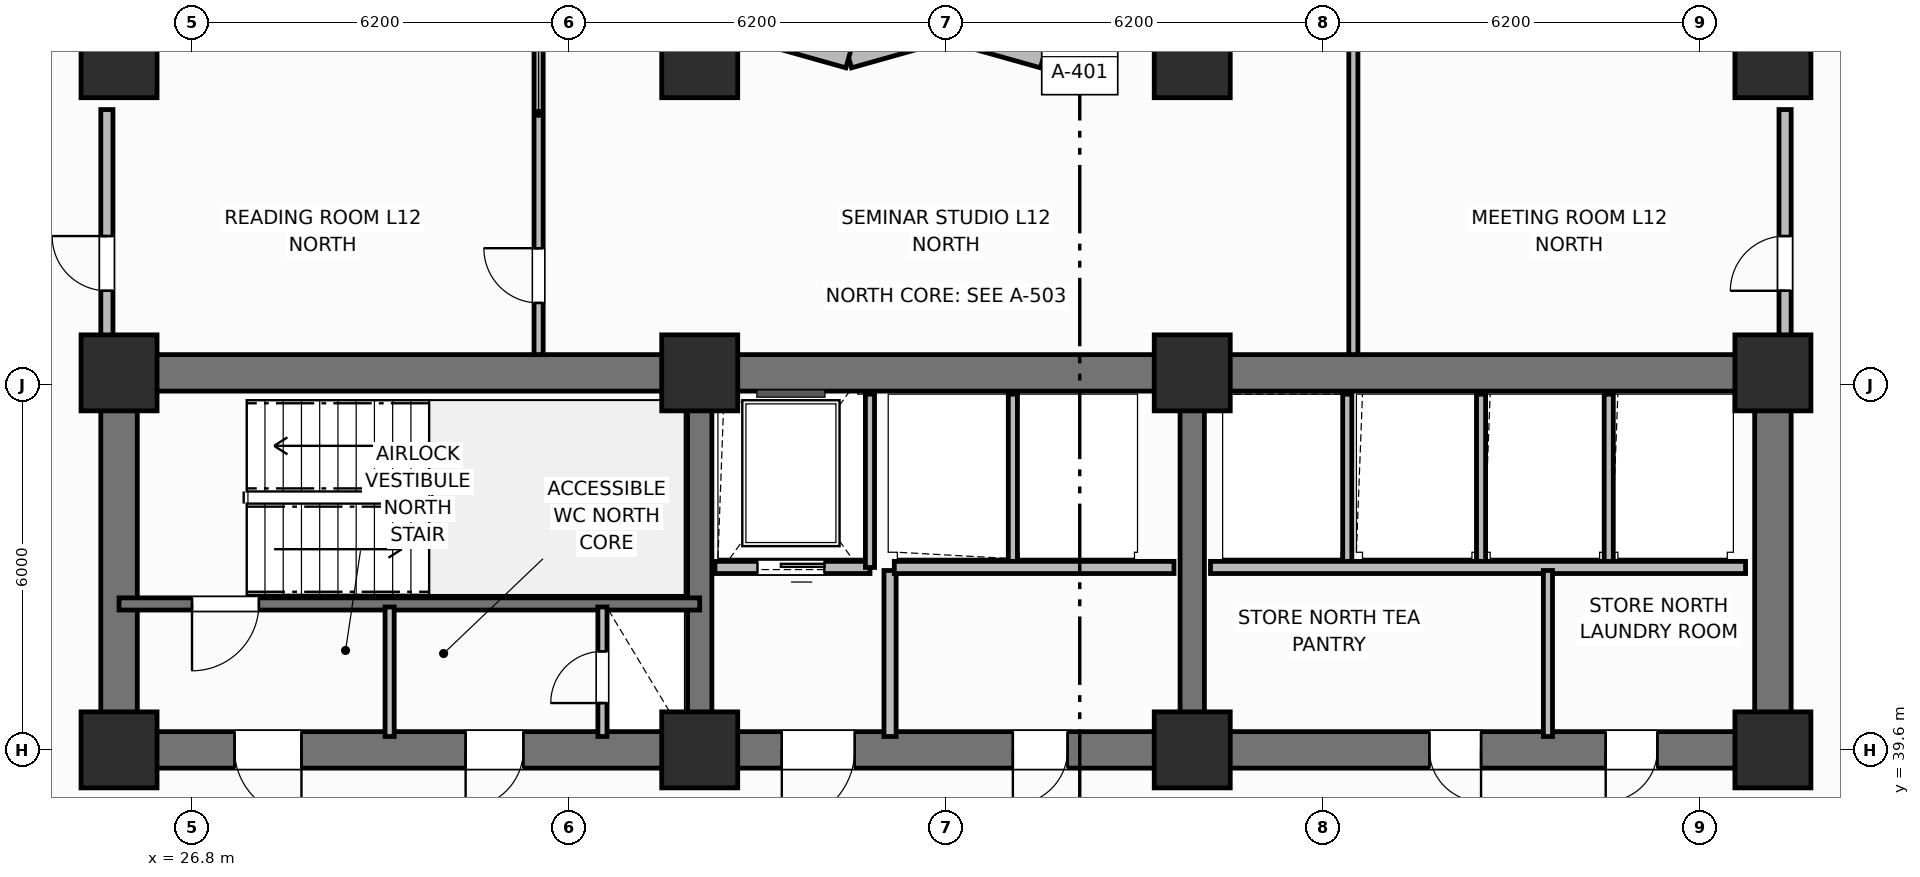
"""IFC4 building model, lengths in metres.
Left out: names, types, materials, properties, quantities, classifications, styles, units other than length and angle.
Written with IfcOpenShell. Run it as: python <this file> out.ifc"""

import sys

from ifc_helpers import new_model, si_unit, direction, frame, frame_2d, origin, origin_2d, place, context, subcontext, project, spatial, rectangle, extrude, element, fill, save


model = new_model("IFC4")
c1 = context("Model", 3, precision=1e-05, world=origin(), true_north=direction((0.0, 1.0)))
c2 = subcontext(c1, "Body", "Model", "MODEL_VIEW")
j1 = project(units=[si_unit("LENGTHUNIT", "METRE"), si_unit("PLANEANGLEUNIT", "RADIAN")], contexts=[c1])
p1 = place(None, origin())
s1 = spatial("IfcSite", under=j1, at=p1, CompositionType="ELEMENT")
p2 = place(p1, origin())
s2 = spatial("IfcBuilding", under=s1, at=p2, CompositionType="ELEMENT")
p3 = place(p2, frame((0.0, 0.0, 51.0)))
s3 = spatial("IfcBuildingStorey", under=s2, at=p3, CompositionType="ELEMENT", Elevation=51.0)
p4 = place(p3, frame((25.6, 45.8, 0.0), z_axis=(0.0, 0.0, 1.0), x_axis=(1.0, 0.0, 0.0)))
e1 = element("IfcWall", 1, at=p4, inside=s3, PredefinedType="SHEAR", context=c2, shape_type="SweptSolid", body=[
    extrude(rectangle(XDim=27.2, YDim=0.6, at=frame_2d((13.6, 0.0))), origin(), (0.0, 0.0, 1.0), 3.7),
])
for number, where, z_axis, x_axis in (
    (2, (25.6, 39.9, 0.0), (0.0, 0.0, 1.0), (0.0, 1.0, 0.0)),
    (3, (52.8, 39.9, 0.0), (0.0, 0.0, 1.0), (0.0, 1.0, 0.0)),
):
    element("IfcWall", number, at=place(p3, frame(where, z_axis=z_axis, x_axis=x_axis)), inside=s3, PredefinedType="SHEAR", context=c2, shape_type="SweptSolid", body=[
        extrude(rectangle(XDim=5.6, YDim=0.6, at=frame_2d((2.8, 0.0))), origin(), (0.0, 0.0, 1.0), 3.7),
    ])
p5 = place(p3, frame((52.8, 39.6, 0.0), z_axis=(0.0, 0.0, 1.0), x_axis=(-1.0, 0.0, 0.0)))
e4 = element("IfcWall", 4, at=p5, inside=s3, PredefinedType="SHEAR", context=c2, shape_type="SweptSolid", body=[
    extrude(rectangle(XDim=27.2, YDim=0.6, at=frame_2d((13.6, 0.0))), origin(), (0.0, 0.0, 1.0), 3.7),
])
p6 = place(p5, frame((24.2, 0.0, 0.0)))
e5 = element("IfcOpeningElement", 5, at=p6, cuts=e4, PredefinedType="OPENING", context=c2, shape_type="SweptSolid", body=[
    extrude(rectangle(XDim=1.1, YDim=2.15, at=frame_2d((0.55, 1.075))), frame((0.0, 0.31, 0.0), z_axis=(0.0, -1.0, 0.0), x_axis=(1.0, 0.0, 0.0)), (0.0, 0.0, 1.0), 0.62),
])
p7 = place(p5, frame((20.55, 0.0, 0.0)))
e6 = element("IfcOpeningElement", 6, at=p7, cuts=e4, PredefinedType="OPENING", context=c2, shape_type="SweptSolid", body=[
    extrude(rectangle(XDim=0.95, YDim=2.1, at=frame_2d((0.475, 1.05))), frame((0.0, 0.31, 0.0), z_axis=(0.0, -1.0, 0.0), x_axis=(1.0, 0.0, 0.0)), (0.0, 0.0, 1.0), 0.62),
])
p8 = place(p5, frame((15.1, 0.0, 0.0)))
e7 = element("IfcOpeningElement", 7, at=p8, cuts=e4, PredefinedType="OPENING", context=c2, shape_type="SweptSolid", body=[
    extrude(rectangle(XDim=1.2, YDim=2.15, at=frame_2d((0.6, 1.075))), frame((0.0, 0.31, 0.0), z_axis=(0.0, -1.0, 0.0), x_axis=(1.0, 0.0, 0.0)), (0.0, 0.0, 1.0), 0.62),
])
p9 = place(p5, frame((11.6, 0.0, 0.0)))
e8 = element("IfcOpeningElement", 8, at=p9, cuts=e4, PredefinedType="OPENING", context=c2, shape_type="SweptSolid", body=[
    extrude(rectangle(XDim=0.9, YDim=2.1, at=frame_2d((0.45, 1.05))), frame((0.0, 0.31, 0.0), z_axis=(0.0, -1.0, 0.0), x_axis=(1.0, 0.0, 0.0)), (0.0, 0.0, 1.0), 0.62),
])
p10 = place(p5, frame((4.8, 0.0, 0.0)))
e9 = element("IfcOpeningElement", 9, at=p10, cuts=e4, PredefinedType="OPENING", context=c2, shape_type="SweptSolid", body=[
    extrude(rectangle(XDim=0.85, YDim=2.1, at=frame_2d((0.425, 1.05))), frame((0.0, 0.31, 0.0), z_axis=(0.0, -1.0, 0.0), x_axis=(1.0, 0.0, 0.0)), (0.0, 0.0, 1.0), 0.62),
])
p11 = place(p5, frame((1.9, 0.0, 0.0)))
e10 = element("IfcOpeningElement", 10, at=p11, cuts=e4, PredefinedType="OPENING", context=c2, shape_type="SweptSolid", body=[
    extrude(rectangle(XDim=0.85, YDim=2.1, at=frame_2d((0.425, 1.05))), frame((0.0, 0.31, 0.0), z_axis=(0.0, -1.0, 0.0), x_axis=(1.0, 0.0, 0.0)), (0.0, 0.0, 1.0), 0.62),
])
for number, where, z_axis, x_axis in (
    (11, (35.15, 39.9, 0.0), (0.0, 0.0, 1.0), (0.0, 1.0, 0.0)),
    (12, (43.25, 39.9, 0.0), (0.0, 0.0, 1.0), (0.0, 1.0, 0.0)),
):
    element("IfcWall", number, at=place(p3, frame(where, z_axis=z_axis, x_axis=x_axis)), inside=s3, PredefinedType="SHEAR", context=c2, shape_type="SweptSolid", body=[
        extrude(rectangle(XDim=5.6, YDim=0.4, at=frame_2d((2.8, 0.0))), origin(), (0.0, 0.0, 1.0), 3.7),
    ])
for number, where, z_axis, x_axis in (
    (13, (25.6, 39.6, 0.0), (0.0, 0.0, 1.0), (1.0, 0.0, 0.0)),
    (14, (25.6, 45.8, 0.0), (0.0, 0.0, 1.0), (1.0, 0.0, 0.0)),
    (15, (35.15, 39.6, 0.0), (0.0, 0.0, 1.0), (1.0, 0.0, 0.0)),
    (16, (35.15, 45.8, 0.0), (0.0, 0.0, 1.0), (1.0, 0.0, 0.0)),
    (17, (43.25, 39.6, 0.0), (0.0, 0.0, 1.0), (1.0, 0.0, 0.0)),
    (18, (43.25, 45.8, 0.0), (0.0, 0.0, 1.0), (1.0, 0.0, 0.0)),
    (19, (52.8, 39.6, 0.0), (0.0, 0.0, 1.0), (1.0, 0.0, 0.0)),
    (20, (52.8, 45.8, 0.0), (0.0, 0.0, 1.0), (1.0, 0.0, 0.0)),
    (21, (25.6, 50.95, 0.0), (0.0, 0.0, 1.0), (1.0, 0.0, 0.0)),
    (22, (35.15, 50.95, 0.0), (0.0, 0.0, 1.0), (1.0, 0.0, 0.0)),
    (23, (43.25, 50.95, 0.0), (0.0, 0.0, 1.0), (1.0, 0.0, 0.0)),
    (24, (52.8, 50.95, 0.0), (0.0, 0.0, 1.0), (1.0, 0.0, 0.0)),
):
    element("IfcColumn", number, at=place(p3, frame(where, z_axis=z_axis, x_axis=x_axis)), inside=s3, PredefinedType="COLUMN", context=c2, shape_type="SweptSolid", body=[
        extrude(rectangle(XDim=1.25, YDim=1.25, at=origin_2d()), origin(), (0.0, 0.0, 1.0), 3.7),
    ])
p12 = place(p3, frame((42.4, 51.43, 0.0), z_axis=(0.0, 0.0, 1.0), x_axis=(-0.962652136636, -0.270741322725, 0.0)))
e25 = element("IfcWall", 25, at=p12, inside=s3, PredefinedType="SOLIDWALL", context=c2, shape_type="SweptSolid", body=[
    extrude(rectangle(XDim=1.662, YDim=0.34, at=frame_2d((0.831, 0.0))), origin(), (0.0, 0.0, 1.0), 2.7),
])
p13 = place(p3, frame((40.8, 50.98, 0.0), z_axis=(0.0, 0.0, 1.0), x_axis=(-0.962662902433, 0.270703040766, 0.0)))
e26 = element("IfcWall", 26, at=p13, inside=s3, PredefinedType="SOLIDWALL", context=c2, shape_type="SweptSolid", body=[
    extrude(rectangle(XDim=1.662, YDim=0.34, at=frame_2d((0.831, 0.0))), origin(), (0.0, 0.0, 1.0), 2.7),
])
p14 = place(p3, frame((39.2, 51.43, 0.0), z_axis=(0.0, 0.0, 1.0), x_axis=(-0.962652136636, -0.270741322725, 0.0)))
e27 = element("IfcWall", 27, at=p14, inside=s3, PredefinedType="SOLIDWALL", context=c2, shape_type="SweptSolid", body=[
    extrude(rectangle(XDim=1.662, YDim=0.34, at=frame_2d((0.831, 0.0))), origin(), (0.0, 0.0, 1.0), 2.7),
])
p15 = place(p3, frame((37.6, 50.98, 0.0), z_axis=(0.0, 0.0, 1.0), x_axis=(-0.962662902433, 0.270703040766, 0.0)))
e28 = element("IfcWall", 28, at=p15, inside=s3, PredefinedType="SOLIDWALL", context=c2, shape_type="SweptSolid", body=[
    extrude(rectangle(XDim=1.662, YDim=0.34, at=frame_2d((0.831, 0.0))), origin(), (0.0, 0.0, 1.0), 2.7),
])
p16 = place(p3, frame((35.15, 42.0, 0.0), z_axis=(0.0, 0.0, 1.0), x_axis=(-1.0, 0.0, 0.0)))
e29 = element("IfcWall", 29, at=p16, inside=s3, PredefinedType="SHEAR", context=c2, shape_type="SweptSolid", body=[
    extrude(rectangle(XDim=9.55, YDim=0.2, at=frame_2d((4.775, 0.0))), origin(), (0.0, 0.0, 1.0), 3.7),
])
p17 = place(p16, frame((7.25, 0.0, 0.0)))
e30 = element("IfcOpeningElement", 30, at=p17, cuts=e29, PredefinedType="OPENING", context=c2, shape_type="SweptSolid", body=[
    extrude(rectangle(XDim=1.1, YDim=2.15, at=frame_2d((0.55, 1.075))), frame((0.0, 0.11, 0.0), z_axis=(0.0, -1.0, 0.0), x_axis=(1.0, 0.0, 0.0)), (0.0, 0.0, 1.0), 0.22),
])
p18 = place(p3, frame((33.55, 39.82, 0.0), z_axis=(0.0, 0.0, 1.0), x_axis=(0.0, 1.0, 0.0)))
e31 = element("IfcWall", 31, at=p18, inside=s3, PredefinedType="PARTITIONING", context=c2, shape_type="SweptSolid", body=[
    extrude(rectangle(XDim=2.13, YDim=0.15, at=frame_2d((1.065, 0.0))), origin(), (0.0, 0.0, 1.0), 2.53),
])
p19 = place(p18, frame((0.55, 0.0, 0.0)))
e32 = element("IfcOpeningElement", 32, at=p19, cuts=e31, PredefinedType="OPENING", context=c2, shape_type="SweptSolid", body=[
    extrude(rectangle(XDim=0.85, YDim=2.05, at=frame_2d((0.425, 1.025))), frame((0.0, 0.085, 0.0), z_axis=(0.0, -1.0, 0.0), x_axis=(1.0, 0.0, 0.0)), (0.0, 0.0, 1.0), 0.17),
])
p20 = place(p3, frame((30.05, 39.82, 0.0), z_axis=(0.0, 0.0, 1.0), x_axis=(0.0, 1.0, 0.0)))
e33 = element("IfcWall", 33, at=p20, inside=s3, PredefinedType="PARTITIONING", context=c2, shape_type="SweptSolid", body=[
    extrude(rectangle(XDim=2.13, YDim=0.15, at=frame_2d((1.065, 0.0))), origin(), (0.0, 0.0, 1.0), 2.53),
])
p21 = place(p3, frame((37.95, 42.6, 0.0), z_axis=(0.0, 0.0, 1.0), x_axis=(-1.0, 0.0, 0.0)))
e34 = element("IfcWall", 34, at=p21, inside=s3, PredefinedType="PARTITIONING", context=c2, shape_type="SweptSolid", body=[
    extrude(rectangle(XDim=2.55, YDim=0.2, at=frame_2d((1.275, 0.0))), origin(), (0.0, 0.0, 1.0), 2.3),
])
p22 = place(p21, frame((0.75, 0.0, 0.0)))
e35 = element("IfcOpeningElement", 35, at=p22, cuts=e34, PredefinedType="OPENING", context=c2, shape_type="SweptSolid", body=[
    extrude(rectangle(XDim=1.1, YDim=2.15, at=frame_2d((0.55, 1.075))), frame((0.0, 0.11, 0.0), z_axis=(0.0, -1.0, 0.0), x_axis=(1.0, 0.0, 0.0)), (0.0, 0.0, 1.0), 0.22),
])
p23 = place(p3, frame((37.95, 42.6, 0.0), z_axis=(0.0, 0.0, 1.0), x_axis=(0.0, 1.0, 0.0)))
e36 = element("IfcWall", 36, at=p23, inside=s3, PredefinedType="PARTITIONING", context=c2, shape_type="SweptSolid", body=[
    extrude(rectangle(XDim=2.85, YDim=0.15, at=frame_2d((1.425, 0.0))), origin(), (0.0, 0.0, 1.0), 2.53),
])
p24 = place(p3, frame((38.28, 39.82, 0.0), z_axis=(0.0, 0.0, 1.0), x_axis=(0.0, 1.0, 0.0)))
e37 = element("IfcWall", 37, at=p24, inside=s3, PredefinedType="PARTITIONING", context=c2, shape_type="SweptSolid", body=[
    extrude(rectangle(XDim=2.73, YDim=0.2, at=frame_2d((1.365, 0.0))), origin(), (0.0, 0.0, 1.0), 2.53),
])
p25 = place(p3, frame((40.3, 42.65, 0.0), z_axis=(0.0, 0.0, 1.0), x_axis=(0.0, 1.0, 0.0)))
e38 = element("IfcWall", 38, at=p25, inside=s3, PredefinedType="PARTITIONING", context=c2, shape_type="SweptSolid", body=[
    extrude(rectangle(XDim=2.8, YDim=0.15, at=frame_2d((1.4, 0.0))), origin(), (0.0, 0.0, 1.0), 2.53),
])
p26 = place(p3, frame((42.95, 42.6, 0.0), z_axis=(0.0, 0.0, 1.0), x_axis=(-1.0, 0.0, 0.0)))
e39 = element("IfcWall", 39, at=p26, inside=s3, PredefinedType="PARTITIONING", context=c2, shape_type="SweptSolid", body=[
    extrude(rectangle(XDim=4.6, YDim=0.2, at=frame_2d((2.3, 0.0))), origin(), (0.0, 0.0, 1.0), 2.3),
])
for number, where, z_axis, x_axis in (
    (40, (45.8, 42.65, 0.0), (0.0, 0.0, 1.0), (0.0, 1.0, 0.0)),
    (41, (48.0, 42.65, 0.0), (0.0, 0.0, 1.0), (0.0, 1.0, 0.0)),
    (42, (50.1, 42.65, 0.0), (0.0, 0.0, 1.0), (0.0, 1.0, 0.0)),
):
    element("IfcWall", number, at=place(p3, frame(where, z_axis=z_axis, x_axis=x_axis)), inside=s3, PredefinedType="PARTITIONING", context=c2, shape_type="SweptSolid", body=[
        extrude(rectangle(XDim=2.8, YDim=0.15, at=frame_2d((1.4, 0.0))), origin(), (0.0, 0.0, 1.0), 2.53),
    ])
p27 = place(p3, frame((52.35, 42.6, 0.0), z_axis=(0.0, 0.0, 1.0), x_axis=(-1.0, 0.0, 0.0)))
e43 = element("IfcWall", 43, at=p27, inside=s3, PredefinedType="PARTITIONING", context=c2, shape_type="SweptSolid", body=[
    extrude(rectangle(XDim=8.8, YDim=0.2, at=frame_2d((4.4, 0.0))), origin(), (0.0, 0.0, 1.0), 2.53),
])
p28 = place(p3, frame((49.1, 39.82, 0.0), z_axis=(0.0, 0.0, 1.0), x_axis=(0.0, 1.0, 0.0)))
e44 = element("IfcWall", 44, at=p28, inside=s3, PredefinedType="PARTITIONING", context=c2, shape_type="SweptSolid", body=[
    extrude(rectangle(XDim=2.73, YDim=0.15, at=frame_2d((1.365, 0.0))), origin(), (0.0, 0.0, 1.0), 2.53),
])
p29 = place(p3, frame((32.5, 46.1, 0.0), z_axis=(0.0, 0.0, 1.0), x_axis=(0.0, 1.0, 0.0)))
e45 = element("IfcWall", 45, at=p29, inside=s3, PredefinedType="PARTITIONING", context=c2, shape_type="SweptSolid", body=[
    extrude(rectangle(XDim=5.33, YDim=0.15, at=frame_2d((2.665, 0.0))), origin(), (0.0, 0.0, 1.0), 2.53),
])
p30 = place(p29, frame((0.85, 0.0, 0.0)))
e46 = element("IfcOpeningElement", 46, at=p30, cuts=e45, PredefinedType="OPENING", context=c2, shape_type="SweptSolid", body=[
    extrude(rectangle(XDim=0.9, YDim=2.1, at=frame_2d((0.45, 1.05))), frame((0.0, 0.085, 0.0), z_axis=(0.0, -1.0, 0.0), x_axis=(1.0, 0.0, 0.0)), (0.0, 0.0, 1.0), 0.17),
])
p31 = place(p3, frame((45.9, 46.1, 0.0), z_axis=(0.0, 0.0, 1.0), x_axis=(0.0, 1.0, 0.0)))
e47 = element("IfcWall", 47, at=p31, inside=s3, PredefinedType="PARTITIONING", context=c2, shape_type="SweptSolid", body=[
    extrude(rectangle(XDim=5.33, YDim=0.15, at=frame_2d((2.665, 0.0))), origin(), (0.0, 0.0, 1.0), 2.53),
])
p32 = place(p3, frame((25.4, 46.1, 0.0), z_axis=(0.0, 0.0, 1.0), x_axis=(0.0, 1.0, 0.0)))
e48 = element("IfcWall", 48, at=p32, inside=s3, PredefinedType="PARTITIONING", context=c2, shape_type="SweptSolid", body=[
    extrude(rectangle(XDim=4.03, YDim=0.2, at=frame_2d((2.015, 0.0))), origin(), (0.0, 0.0, 1.0), 2.53),
])
p33 = place(p32, frame((1.05, 0.0, 0.0)))
e49 = element("IfcOpeningElement", 49, at=p33, cuts=e48, PredefinedType="OPENING", context=c2, shape_type="SweptSolid", body=[
    extrude(rectangle(XDim=0.9, YDim=2.1, at=frame_2d((0.45, 1.05))), frame((0.0, 0.11, 0.0), z_axis=(0.0, -1.0, 0.0), x_axis=(1.0, 0.0, 0.0)), (0.0, 0.0, 1.0), 0.22),
])
p34 = place(p3, frame((53.0, 46.1, 0.0), z_axis=(0.0, 0.0, 1.0), x_axis=(0.0, 1.0, 0.0)))
e50 = element("IfcWall", 50, at=p34, inside=s3, PredefinedType="PARTITIONING", context=c2, shape_type="SweptSolid", body=[
    extrude(rectangle(XDim=4.03, YDim=0.2, at=frame_2d((2.015, 0.0))), origin(), (0.0, 0.0, 1.0), 2.53),
])
p35 = place(p34, frame((1.05, 0.0, 0.0)))
e51 = element("IfcOpeningElement", 51, at=p35, cuts=e50, PredefinedType="OPENING", context=c2, shape_type="SweptSolid", body=[
    extrude(rectangle(XDim=0.9, YDim=2.1, at=frame_2d((0.45, 1.05))), frame((0.0, 0.11, 0.0), z_axis=(0.0, -1.0, 0.0), x_axis=(1.0, 0.0, 0.0)), (0.0, 0.0, 1.0), 0.22),
])
p36 = place(p17, origin())
e52 = element("IfcDoor", 52, at=p36, inside=s3, OperationType="SINGLE_SWING_RIGHT", PredefinedType="DOOR", context=c2, shape_type="SweptSolid", body=[
    extrude(rectangle(XDim=1.1, YDim=2.15, at=frame_2d((0.55, 1.075))), frame((0.0, 0.025, 0.0), z_axis=(0.0, -1.0, 0.0), x_axis=(1.0, 0.0, 0.0)), (0.0, 0.0, 1.0), 0.05),
])
fill(e30, e52)
p37 = place(p19, origin())
e53 = element("IfcDoor", 53, at=p37, inside=s3, OperationType="SINGLE_SWING_LEFT", PredefinedType="TRAPDOOR", context=c2, shape_type="SweptSolid", body=[
    extrude(rectangle(XDim=0.85, YDim=2.05, at=frame_2d((0.425, 1.025))), frame((0.0, 0.025, 0.0), z_axis=(0.0, -1.0, 0.0), x_axis=(1.0, 0.0, 0.0)), (0.0, 0.0, 1.0), 0.05),
])
fill(e32, e53)
p38 = place(p22, origin())
e54 = element("IfcDoor", 54, at=p38, inside=s3, OperationType="SLIDING_TO_LEFT", PredefinedType="DOOR", context=c2, shape_type="SweptSolid", body=[
    extrude(rectangle(XDim=1.1, YDim=2.15, at=frame_2d((0.55, 1.075))), frame((0.0, 0.025, 0.0), z_axis=(0.0, -1.0, 0.0), x_axis=(1.0, 0.0, 0.0)), (0.0, 0.0, 1.0), 0.05),
])
fill(e35, e54)
p39 = place(p30, origin())
e55 = element("IfcDoor", 55, at=p39, inside=s3, OperationType="SINGLE_SWING_RIGHT", PredefinedType="DOOR", context=c2, shape_type="SweptSolid", body=[
    extrude(rectangle(XDim=0.9, YDim=2.1, at=frame_2d((0.45, 1.05))), frame((0.0, 0.025, 0.0), z_axis=(0.0, -1.0, 0.0), x_axis=(1.0, 0.0, 0.0)), (0.0, 0.0, 1.0), 0.05),
])
fill(e46, e55)
p40 = place(p33, origin())
e56 = element("IfcDoor", 56, at=p40, inside=s3, OperationType="SINGLE_SWING_RIGHT", PredefinedType="DOOR", context=c2, shape_type="SweptSolid", body=[
    extrude(rectangle(XDim=0.9, YDim=2.1, at=frame_2d((0.45, 1.05))), frame((0.0, 0.025, 0.0), z_axis=(0.0, -1.0, 0.0), x_axis=(1.0, 0.0, 0.0)), (0.0, 0.0, 1.0), 0.05),
])
fill(e49, e56)
p41 = place(p35, origin())
e57 = element("IfcDoor", 57, at=p41, inside=s3, OperationType="SINGLE_SWING_LEFT", PredefinedType="DOOR", context=c2, shape_type="SweptSolid", body=[
    extrude(rectangle(XDim=0.9, YDim=2.1, at=frame_2d((0.45, 1.05))), frame((0.0, 0.025, 0.0), z_axis=(0.0, -1.0, 0.0), x_axis=(1.0, 0.0, 0.0)), (0.0, 0.0, 1.0), 0.05),
])
fill(e51, e57)
p42 = place(p6, origin())
e58 = element("IfcDoor", 58, at=p42, inside=s3, OperationType="SINGLE_SWING_LEFT", PredefinedType="DOOR", context=c2, shape_type="SweptSolid", body=[
    extrude(rectangle(XDim=1.1, YDim=2.15, at=frame_2d((0.55, 1.075))), frame((0.0, 0.025, 0.0), z_axis=(0.0, -1.0, 0.0), x_axis=(1.0, 0.0, 0.0)), (0.0, 0.0, 1.0), 0.05),
])
fill(e5, e58)
p43 = place(p7, origin())
e59 = element("IfcDoor", 59, at=p43, inside=s3, OperationType="SINGLE_SWING_RIGHT", PredefinedType="DOOR", context=c2, shape_type="SweptSolid", body=[
    extrude(rectangle(XDim=0.95, YDim=2.1, at=frame_2d((0.475, 1.05))), frame((0.0, 0.025, 0.0), z_axis=(0.0, -1.0, 0.0), x_axis=(1.0, 0.0, 0.0)), (0.0, 0.0, 1.0), 0.05),
])
fill(e6, e59)
p44 = place(p8, origin())
e60 = element("IfcDoor", 60, at=p44, inside=s3, OperationType="SINGLE_SWING_RIGHT", PredefinedType="DOOR", context=c2, shape_type="SweptSolid", body=[
    extrude(rectangle(XDim=1.2, YDim=2.15, at=frame_2d((0.6, 1.075))), frame((0.0, 0.025, 0.0), z_axis=(0.0, -1.0, 0.0), x_axis=(1.0, 0.0, 0.0)), (0.0, 0.0, 1.0), 0.05),
])
fill(e7, e60)
p45 = place(p9, origin())
e61 = element("IfcDoor", 61, at=p45, inside=s3, OperationType="SINGLE_SWING_RIGHT", PredefinedType="DOOR", context=c2, shape_type="SweptSolid", body=[
    extrude(rectangle(XDim=0.9, YDim=2.1, at=frame_2d((0.45, 1.05))), frame((0.0, 0.025, 0.0), z_axis=(0.0, -1.0, 0.0), x_axis=(1.0, 0.0, 0.0)), (0.0, 0.0, 1.0), 0.05),
])
fill(e8, e61)
p46 = place(p10, origin())
e62 = element("IfcDoor", 62, at=p46, inside=s3, OperationType="SINGLE_SWING_LEFT", PredefinedType="DOOR", context=c2, shape_type="SweptSolid", body=[
    extrude(rectangle(XDim=0.85, YDim=2.1, at=frame_2d((0.425, 1.05))), frame((0.0, 0.025, 0.0), z_axis=(0.0, -1.0, 0.0), x_axis=(1.0, 0.0, 0.0)), (0.0, 0.0, 1.0), 0.05),
])
fill(e9, e62)
p47 = place(p11, origin())
e63 = element("IfcDoor", 63, at=p47, inside=s3, OperationType="SINGLE_SWING_RIGHT", PredefinedType="DOOR", context=c2, shape_type="SweptSolid", body=[
    extrude(rectangle(XDim=0.85, YDim=2.1, at=frame_2d((0.425, 1.05))), frame((0.0, 0.025, 0.0), z_axis=(0.0, -1.0, 0.0), x_axis=(1.0, 0.0, 0.0)), (0.0, 0.0, 1.0), 0.05),
])
fill(e10, e63)
save(model, sys.argv[1])
